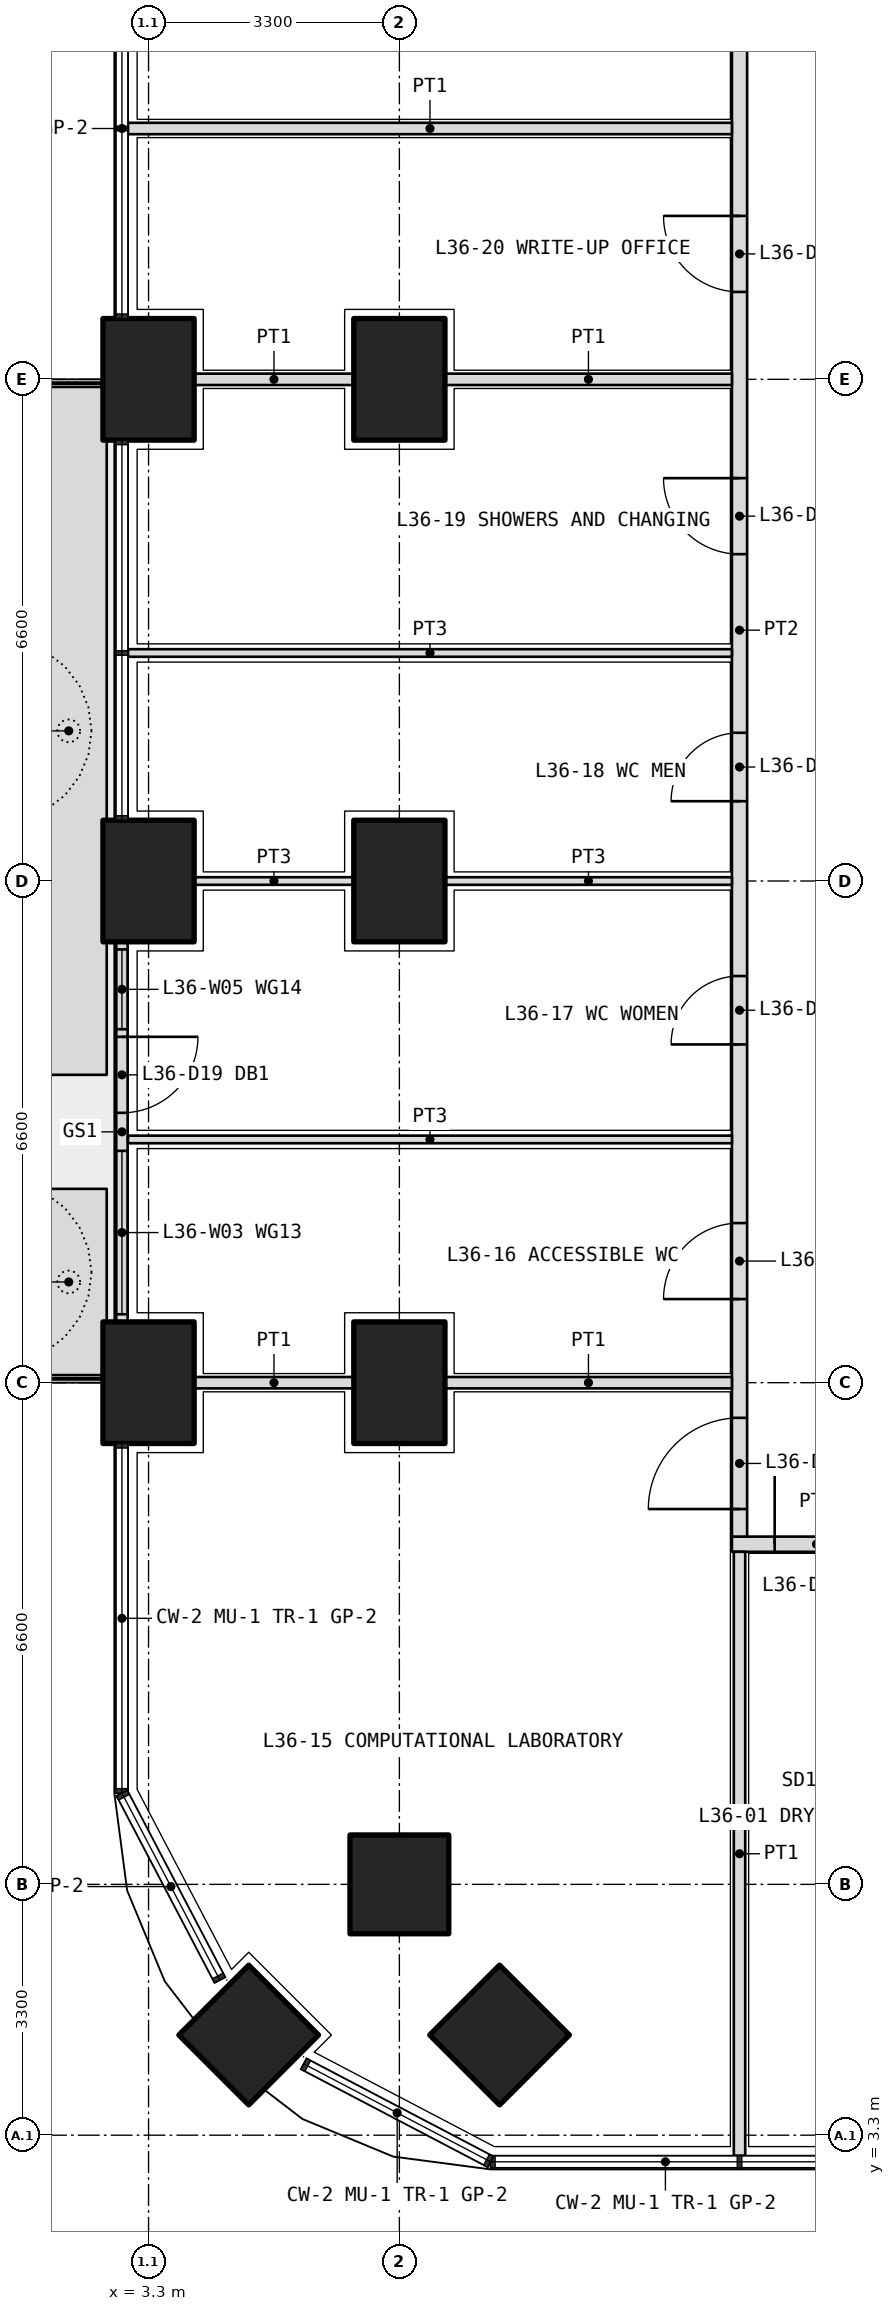
"""IFC4 building model, lengths in metres.
Left out: names, types, materials, properties, quantities, classifications, styles, units other than length and angle.
Written with IfcOpenShell. Run it as: python <this file> out.ifc"""

import sys

from ifc_helpers import new_model, si_unit, direction, frame, frame_2d, origin, origin_2d, place, context, subcontext, project, spatial, polyline, rectangle, outline, extrude, element, fill, save


model = new_model("IFC4")
c1 = context("Model", 3, precision=1e-05, world=origin(), true_north=direction((0.0, 1.0)))
c2 = subcontext(c1, "Body", "Model", "MODEL_VIEW")
j1 = project(units=[si_unit("LENGTHUNIT", "METRE"), si_unit("PLANEANGLEUNIT", "RADIAN")], contexts=[c1])
p1 = place(None, origin())
s1 = spatial("IfcSite", under=j1, at=p1, CompositionType="ELEMENT")
p2 = place(p1, origin())
s2 = spatial("IfcBuilding", under=s1, at=p2, CompositionType="ELEMENT")
p3 = place(p2, frame((0.0, 0.0, 159.9)))
s3 = spatial("IfcBuildingStorey", under=s2, at=p3, CompositionType="ELEMENT", Elevation=159.9)
p4 = place(p3, frame((4.618, 4.618, 0.0), z_axis=(0.0, 0.0, 1.0), x_axis=(0.707106781187, 0.707106781187, 0.0)))
e1 = element("IfcColumn", 1, at=p4, inside=s3, PredefinedType="COLUMN", context=c2, shape_type="SweptSolid", body=[
    extrude(rectangle(XDim=1.3, YDim=1.3, at=origin_2d()), origin(), (0.0, 0.0, 1.0), 4.2),
])
for number, where, z_axis, x_axis in (
    (2, (3.3, 13.2, 0.0), (0.0, 0.0, 1.0), (0.0, 1.0, 0.0)),
    (3, (3.3, 19.8, 0.0), (0.0, 0.0, 1.0), (0.0, 1.0, 0.0)),
    (4, (3.3, 26.4, 0.0), (0.0, 0.0, 1.0), (0.0, 1.0, 0.0)),
):
    element("IfcColumn", number, at=place(p3, frame(where, z_axis=z_axis, x_axis=x_axis)), inside=s3, PredefinedType="COLUMN", context=c2, shape_type="SweptSolid", body=[
        extrude(rectangle(XDim=1.6, YDim=1.2, at=origin_2d()), origin(), (0.0, 0.0, 1.0), 4.2),
    ])
for number, where, z_axis, x_axis in (
    (5, (6.6, 6.6, 0.0), (0.0, 0.0, 1.0), (1.0, 0.0, 0.0)),
    (6, (7.918, 4.618, 0.0), (0.0, 0.0, 1.0), (0.707, 0.707, 0.0)),
):
    element("IfcColumn", number, at=place(p3, frame(where, z_axis=z_axis, x_axis=x_axis)), inside=s3, PredefinedType="COLUMN", context=c2, shape_type="SweptSolid", body=[
        extrude(rectangle(XDim=1.3, YDim=1.3, at=origin_2d()), origin(), (0.0, 0.0, 1.0), 4.2),
    ])
for number, where, z_axis, x_axis in (
    (7, (6.6, 13.2, 0.0), (0.0, 0.0, 1.0), (0.0, 1.0, 0.0)),
    (8, (6.6, 19.8, 0.0), (0.0, 0.0, 1.0), (0.0, 1.0, 0.0)),
    (9, (6.6, 26.4, 0.0), (0.0, 0.0, 1.0), (0.0, 1.0, 0.0)),
):
    element("IfcColumn", number, at=place(p3, frame(where, z_axis=z_axis, x_axis=x_axis)), inside=s3, PredefinedType="COLUMN", context=c2, shape_type="SweptSolid", body=[
        extrude(rectangle(XDim=1.6, YDim=1.2, at=origin_2d()), origin(), (0.0, 0.0, 1.0), 4.2),
    ])
p5 = place(p3, origin())
e10 = element("IfcWall", 10, at=p5, inside=s3, PredefinedType="USERDEFINED", context=c2, shape_type="SweptSolid", body=[
    extrude(outline(polyline([(1.75, 13.3), (2.75, 13.3), (2.75, 15.75), (1.75, 15.75), (1.75, 13.3)]), holes=[polyline([(1.9, 13.45), (2.6, 13.45), (2.6, 15.6), (1.9, 15.6), (1.9, 13.45)])]), origin(), (0.0, 0.0, 1.0), 1.05),
])
p6 = place(p3, origin())
e11 = element("IfcWall", 11, at=p6, inside=s3, PredefinedType="USERDEFINED", context=c2, shape_type="SweptSolid", body=[
    extrude(outline(polyline([(1.75, 17.25), (2.75, 17.25), (2.75, 26.3), (1.75, 26.3), (1.75, 17.25)]), holes=[polyline([(1.9, 17.4), (2.6, 17.4), (2.6, 26.15), (1.9, 26.15), (1.9, 17.4)])]), origin(), (0.0, 0.0, 1.0), 1.05),
])
p7 = place(p3, frame((2.95, 19.0, 0.0), z_axis=(0.0, 0.0, 1.0), x_axis=(0.0, -1.0, 0.0)))
e12 = element("IfcWall", 12, at=p7, inside=s3, PredefinedType="SOLIDWALL", context=c2, shape_type="SweptSolid", body=[
    extrude(rectangle(XDim=5.0, YDim=0.15, at=frame_2d((2.5, 0.0))), origin(), (0.0, 0.0, 1.0), 2.7),
])
p8 = place(p7, frame((1.25, 0.0, 0.0)))
e13 = element("IfcOpeningElement", 13, at=p8, cuts=e12, PredefinedType="OPENING", context=c2, shape_type="SweptSolid", body=[
    extrude(rectangle(XDim=1.0, YDim=2.4, at=frame_2d((0.5, 1.2))), frame((0.0, 0.085, 0.0), z_axis=(0.0, -1.0, 0.0), x_axis=(1.0, 0.0, 0.0)), (0.0, 0.0, 1.0), 0.17),
])
p9 = place(p7, frame((0.1, 0.0, 0.1)))
e14 = element("IfcOpeningElement", 14, at=p9, cuts=e12, PredefinedType="OPENING", context=c2, shape_type="SweptSolid", body=[
    extrude(rectangle(XDim=1.05, YDim=2.3, at=frame_2d((0.525, 1.15))), frame((0.0, 0.085, 0.0), z_axis=(0.0, -1.0, 0.0), x_axis=(1.0, 0.0, 0.0)), (0.0, 0.0, 1.0), 0.17),
])
p10 = place(p7, frame((2.75, 0.0, 0.1)))
e15 = element("IfcOpeningElement", 15, at=p10, cuts=e12, PredefinedType="OPENING", context=c2, shape_type="SweptSolid", body=[
    extrude(rectangle(XDim=2.15, YDim=2.3, at=frame_2d((1.075, 1.15))), frame((0.0, 0.085, 0.0), z_axis=(0.0, -1.0, 0.0), x_axis=(1.0, 0.0, 0.0)), (0.0, 0.0, 1.0), 0.17),
])
p11 = place(p3, frame((10.975, 11.075, 0.0), z_axis=(0.0, 0.0, 1.0), x_axis=(1.0, 0.0, 0.0)))
e16 = element("IfcWall", 16, at=p11, inside=s3, PredefinedType="PARTITIONING", context=c2, shape_type="SweptSolid", body=[
    extrude(rectangle(XDim=2.225, YDim=0.2, at=frame_2d((1.112, 0.0))), origin(), (0.0, 0.0, 1.0), 2.85),
])
p12 = place(p11, frame((0.562, 0.0, 0.0)))
e17 = element("IfcOpeningElement", 17, at=p12, cuts=e16, PredefinedType="OPENING", context=c2, shape_type="SweptSolid", body=[
    extrude(rectangle(XDim=1.2, YDim=2.1, at=frame_2d((0.6, 1.05))), frame((0.0, 0.11, 0.0), z_axis=(0.0, -1.0, 0.0), x_axis=(1.0, 0.0, 0.0)), (0.0, 0.0, 1.0), 0.22),
])
p13 = place(p3, frame((11.075, 11.175, 0.0), z_axis=(0.0, 0.0, 1.0), x_axis=(0.0, 1.0, 0.0)))
e18 = element("IfcWall", 18, at=p13, inside=s3, PredefinedType="PARTITIONING", context=c2, shape_type="SweptSolid", body=[
    extrude(rectangle(XDim=23.85, YDim=0.2, at=frame_2d((11.925, 0.0))), origin(), (0.0, 0.0, 1.0), 2.85),
])
p14 = place(p13, frame((0.363, 0.0, 0.0)))
e19 = element("IfcOpeningElement", 19, at=p14, cuts=e18, PredefinedType="OPENING", context=c2, shape_type="SweptSolid", body=[
    extrude(rectangle(XDim=1.2, YDim=2.1, at=frame_2d((0.6, 1.05))), frame((0.0, 0.11, 0.0), z_axis=(0.0, -1.0, 0.0), x_axis=(1.0, 0.0, 0.0)), (0.0, 0.0, 1.0), 0.22),
])
p15 = place(p13, frame((3.125, 0.0, 0.0)))
e20 = element("IfcOpeningElement", 20, at=p15, cuts=e18, PredefinedType="OPENING", context=c2, shape_type="SweptSolid", body=[
    extrude(rectangle(XDim=1.0, YDim=2.1, at=frame_2d((0.5, 1.05))), frame((0.0, 0.11, 0.0), z_axis=(0.0, -1.0, 0.0), x_axis=(1.0, 0.0, 0.0)), (0.0, 0.0, 1.0), 0.22),
])
p16 = place(p13, frame((6.475, 0.0, 0.0)))
e21 = element("IfcOpeningElement", 21, at=p16, cuts=e18, PredefinedType="OPENING", context=c2, shape_type="SweptSolid", body=[
    extrude(rectangle(XDim=0.9, YDim=2.1, at=frame_2d((0.45, 1.05))), frame((0.0, 0.11, 0.0), z_axis=(0.0, -1.0, 0.0), x_axis=(1.0, 0.0, 0.0)), (0.0, 0.0, 1.0), 0.22),
])
p17 = place(p13, frame((9.675, 0.0, 0.0)))
e22 = element("IfcOpeningElement", 22, at=p17, cuts=e18, PredefinedType="OPENING", context=c2, shape_type="SweptSolid", body=[
    extrude(rectangle(XDim=0.9, YDim=2.1, at=frame_2d((0.45, 1.05))), frame((0.0, 0.11, 0.0), z_axis=(0.0, -1.0, 0.0), x_axis=(1.0, 0.0, 0.0)), (0.0, 0.0, 1.0), 0.22),
])
p18 = place(p13, frame((12.925, 0.0, 0.0)))
e23 = element("IfcOpeningElement", 23, at=p18, cuts=e18, PredefinedType="OPENING", context=c2, shape_type="SweptSolid", body=[
    extrude(rectangle(XDim=1.0, YDim=2.1, at=frame_2d((0.5, 1.05))), frame((0.0, 0.11, 0.0), z_axis=(0.0, -1.0, 0.0), x_axis=(1.0, 0.0, 0.0)), (0.0, 0.0, 1.0), 0.22),
])
p19 = place(p13, frame((16.375, 0.0, 0.0)))
e24 = element("IfcOpeningElement", 24, at=p19, cuts=e18, PredefinedType="OPENING", context=c2, shape_type="SweptSolid", body=[
    extrude(rectangle(XDim=1.0, YDim=2.1, at=frame_2d((0.5, 1.05))), frame((0.0, 0.11, 0.0), z_axis=(0.0, -1.0, 0.0), x_axis=(1.0, 0.0, 0.0)), (0.0, 0.0, 1.0), 0.22),
])
p20 = place(p13, frame((20.637, 0.0, 0.0)))
e25 = element("IfcOpeningElement", 25, at=p20, cuts=e18, PredefinedType="OPENING", context=c2, shape_type="SweptSolid", body=[
    extrude(rectangle(XDim=1.2, YDim=2.1, at=frame_2d((0.6, 1.05))), frame((0.0, 0.11, 0.0), z_axis=(0.0, -1.0, 0.0), x_axis=(1.0, 0.0, 0.0)), (0.0, 0.0, 1.0), 0.22),
])
p21 = place(p3, frame((11.075, 3.03, 0.0), z_axis=(0.0, 0.0, 1.0), x_axis=(0.0, 1.0, 0.0)))
e26 = element("IfcWall", 26, at=p21, inside=s3, PredefinedType="PARTITIONING", context=c2, shape_type="SweptSolid", body=[
    extrude(rectangle(XDim=7.945, YDim=0.15, at=frame_2d((3.973, 0.0))), origin(), (0.0, 0.0, 1.0), 2.7),
])
p22 = place(p3, frame((3.03, 16.4, 0.0), z_axis=(0.0, 0.0, 1.0), x_axis=(1.0, 0.0, 0.0)))
e27 = element("IfcWall", 27, at=p22, inside=s3, PredefinedType="PARTITIONING", context=c2, shape_type="SweptSolid", body=[
    extrude(rectangle(XDim=7.945, YDim=0.1, at=frame_2d((3.973, 0.0))), origin(), (0.0, 0.0, 1.0), 2.7),
])
p23 = place(p3, frame((3.9, 19.8, 0.0), z_axis=(0.0, 0.0, 1.0), x_axis=(1.0, 0.0, 0.0)))
e28 = element("IfcWall", 28, at=p23, inside=s3, PredefinedType="PARTITIONING", context=c2, shape_type="SweptSolid", body=[
    extrude(rectangle(XDim=2.1, YDim=0.1, at=frame_2d((1.05, 0.0))), origin(), (0.0, 0.0, 1.0), 2.85),
])
p24 = place(p3, frame((7.2, 19.8, 0.0), z_axis=(0.0, 0.0, 1.0), x_axis=(1.0, 0.0, 0.0)))
e29 = element("IfcWall", 29, at=p24, inside=s3, PredefinedType="PARTITIONING", context=c2, shape_type="SweptSolid", body=[
    extrude(rectangle(XDim=3.775, YDim=0.1, at=frame_2d((1.888, 0.0))), origin(), (0.0, 0.0, 1.0), 2.85),
])
p25 = place(p3, frame((3.03, 22.8, 0.0), z_axis=(0.0, 0.0, 1.0), x_axis=(1.0, 0.0, 0.0)))
e30 = element("IfcWall", 30, at=p25, inside=s3, PredefinedType="PARTITIONING", context=c2, shape_type="SweptSolid", body=[
    extrude(rectangle(XDim=7.945, YDim=0.1, at=frame_2d((3.973, 0.0))), origin(), (0.0, 0.0, 1.0), 2.7),
])
p26 = place(p3, frame((3.9, 13.2, 0.0), z_axis=(0.0, 0.0, 1.0), x_axis=(1.0, 0.0, 0.0)))
e31 = element("IfcWall", 31, at=p26, inside=s3, PredefinedType="PARTITIONING", context=c2, shape_type="SweptSolid", body=[
    extrude(rectangle(XDim=2.1, YDim=0.15, at=frame_2d((1.05, 0.0))), origin(), (0.0, 0.0, 1.0), 2.85),
])
p27 = place(p3, frame((7.2, 13.2, 0.0), z_axis=(0.0, 0.0, 1.0), x_axis=(1.0, 0.0, 0.0)))
e32 = element("IfcWall", 32, at=p27, inside=s3, PredefinedType="PARTITIONING", context=c2, shape_type="SweptSolid", body=[
    extrude(rectangle(XDim=3.775, YDim=0.15, at=frame_2d((1.888, 0.0))), origin(), (0.0, 0.0, 1.0), 2.85),
])
p28 = place(p3, frame((3.9, 26.4, 0.0), z_axis=(0.0, 0.0, 1.0), x_axis=(1.0, 0.0, 0.0)))
e33 = element("IfcWall", 33, at=p28, inside=s3, PredefinedType="PARTITIONING", context=c2, shape_type="SweptSolid", body=[
    extrude(rectangle(XDim=2.1, YDim=0.15, at=frame_2d((1.05, 0.0))), origin(), (0.0, 0.0, 1.0), 2.85),
])
p29 = place(p3, frame((7.2, 26.4, 0.0), z_axis=(0.0, 0.0, 1.0), x_axis=(1.0, 0.0, 0.0)))
e34 = element("IfcWall", 34, at=p29, inside=s3, PredefinedType="PARTITIONING", context=c2, shape_type="SweptSolid", body=[
    extrude(rectangle(XDim=3.775, YDim=0.15, at=frame_2d((1.888, 0.0))), origin(), (0.0, 0.0, 1.0), 2.85),
])
p30 = place(p3, frame((3.03, 29.7, 0.0), z_axis=(0.0, 0.0, 1.0), x_axis=(1.0, 0.0, 0.0)))
e35 = element("IfcWall", 35, at=p30, inside=s3, PredefinedType="PARTITIONING", context=c2, shape_type="SweptSolid", body=[
    extrude(rectangle(XDim=7.945, YDim=0.15, at=frame_2d((3.973, 0.0))), origin(), (0.0, 0.0, 1.0), 2.7),
])
p31 = place(p8, origin())
e36 = element("IfcDoor", 36, at=p31, inside=s3, OperationType="SINGLE_SWING_LEFT", PredefinedType="DOOR", context=c2, shape_type="SweptSolid", body=[
    extrude(rectangle(XDim=1.0, YDim=2.4, at=frame_2d((0.5, 1.2))), frame((0.0, 0.025, 0.0), z_axis=(0.0, -1.0, 0.0), x_axis=(1.0, 0.0, 0.0)), (0.0, 0.0, 1.0), 0.05),
])
fill(e13, e36)
p32 = place(p9, origin())
e37 = element("IfcWindow", 37, at=p32, inside=s3, PartitioningType="SINGLE_PANEL", PredefinedType="WINDOW", context=c2, shape_type="SweptSolid", body=[
    extrude(rectangle(XDim=1.05, YDim=2.3, at=frame_2d((0.525, 1.15))), frame((0.0, 0.03, 0.0), z_axis=(0.0, -1.0, 0.0), x_axis=(1.0, 0.0, 0.0)), (0.0, 0.0, 1.0), 0.06),
])
fill(e14, e37)
p33 = place(p10, origin())
e38 = element("IfcWindow", 38, at=p33, inside=s3, PartitioningType="SINGLE_PANEL", PredefinedType="WINDOW", context=c2, shape_type="SweptSolid", body=[
    extrude(rectangle(XDim=2.15, YDim=2.3, at=frame_2d((1.075, 1.15))), frame((0.0, 0.03, 0.0), z_axis=(0.0, -1.0, 0.0), x_axis=(1.0, 0.0, 0.0)), (0.0, 0.0, 1.0), 0.06),
])
fill(e15, e38)
p34 = place(p12, origin())
e39 = element("IfcDoor", 39, at=p34, inside=s3, OperationType="DOUBLE_DOOR_SINGLE_SWING", PredefinedType="DOOR", context=c2, shape_type="SweptSolid", body=[
    extrude(rectangle(XDim=1.2, YDim=2.1, at=frame_2d((0.6, 1.05))), frame((0.0, 0.025, 0.0), z_axis=(0.0, -1.0, 0.0), x_axis=(1.0, 0.0, 0.0)), (0.0, 0.0, 1.0), 0.05),
])
fill(e17, e39)
p35 = place(p14, origin())
e40 = element("IfcDoor", 40, at=p35, inside=s3, OperationType="DOUBLE_DOOR_SINGLE_SWING", PredefinedType="DOOR", context=c2, shape_type="SweptSolid", body=[
    extrude(rectangle(XDim=1.2, YDim=2.1, at=frame_2d((0.6, 1.05))), frame((0.0, 0.025, 0.0), z_axis=(0.0, -1.0, 0.0), x_axis=(1.0, 0.0, 0.0)), (0.0, 0.0, 1.0), 0.05),
])
fill(e19, e40)
p36 = place(p15, origin())
e41 = element("IfcDoor", 41, at=p36, inside=s3, OperationType="SINGLE_SWING_LEFT", PredefinedType="DOOR", context=c2, shape_type="SweptSolid", body=[
    extrude(rectangle(XDim=1.0, YDim=2.1, at=frame_2d((0.5, 1.05))), frame((0.0, 0.025, 0.0), z_axis=(0.0, -1.0, 0.0), x_axis=(1.0, 0.0, 0.0)), (0.0, 0.0, 1.0), 0.05),
])
fill(e20, e41)
p37 = place(p16, origin())
e42 = element("IfcDoor", 42, at=p37, inside=s3, OperationType="SINGLE_SWING_LEFT", PredefinedType="DOOR", context=c2, shape_type="SweptSolid", body=[
    extrude(rectangle(XDim=0.9, YDim=2.1, at=frame_2d((0.45, 1.05))), frame((0.0, 0.025, 0.0), z_axis=(0.0, -1.0, 0.0), x_axis=(1.0, 0.0, 0.0)), (0.0, 0.0, 1.0), 0.05),
])
fill(e21, e42)
p38 = place(p17, origin())
e43 = element("IfcDoor", 43, at=p38, inside=s3, OperationType="SINGLE_SWING_LEFT", PredefinedType="DOOR", context=c2, shape_type="SweptSolid", body=[
    extrude(rectangle(XDim=0.9, YDim=2.1, at=frame_2d((0.45, 1.05))), frame((0.0, 0.025, 0.0), z_axis=(0.0, -1.0, 0.0), x_axis=(1.0, 0.0, 0.0)), (0.0, 0.0, 1.0), 0.05),
])
fill(e22, e43)
p39 = place(p18, origin())
e44 = element("IfcDoor", 44, at=p39, inside=s3, OperationType="SINGLE_SWING_RIGHT", PredefinedType="DOOR", context=c2, shape_type="SweptSolid", body=[
    extrude(rectangle(XDim=1.0, YDim=2.1, at=frame_2d((0.5, 1.05))), frame((0.0, 0.025, 0.0), z_axis=(0.0, -1.0, 0.0), x_axis=(1.0, 0.0, 0.0)), (0.0, 0.0, 1.0), 0.05),
])
fill(e23, e44)
p40 = place(p19, origin())
e45 = element("IfcDoor", 45, at=p40, inside=s3, OperationType="SINGLE_SWING_RIGHT", PredefinedType="DOOR", context=c2, shape_type="SweptSolid", body=[
    extrude(rectangle(XDim=1.0, YDim=2.1, at=frame_2d((0.5, 1.05))), frame((0.0, 0.025, 0.0), z_axis=(0.0, -1.0, 0.0), x_axis=(1.0, 0.0, 0.0)), (0.0, 0.0, 1.0), 0.05),
])
fill(e24, e45)
save(model, sys.argv[1])
